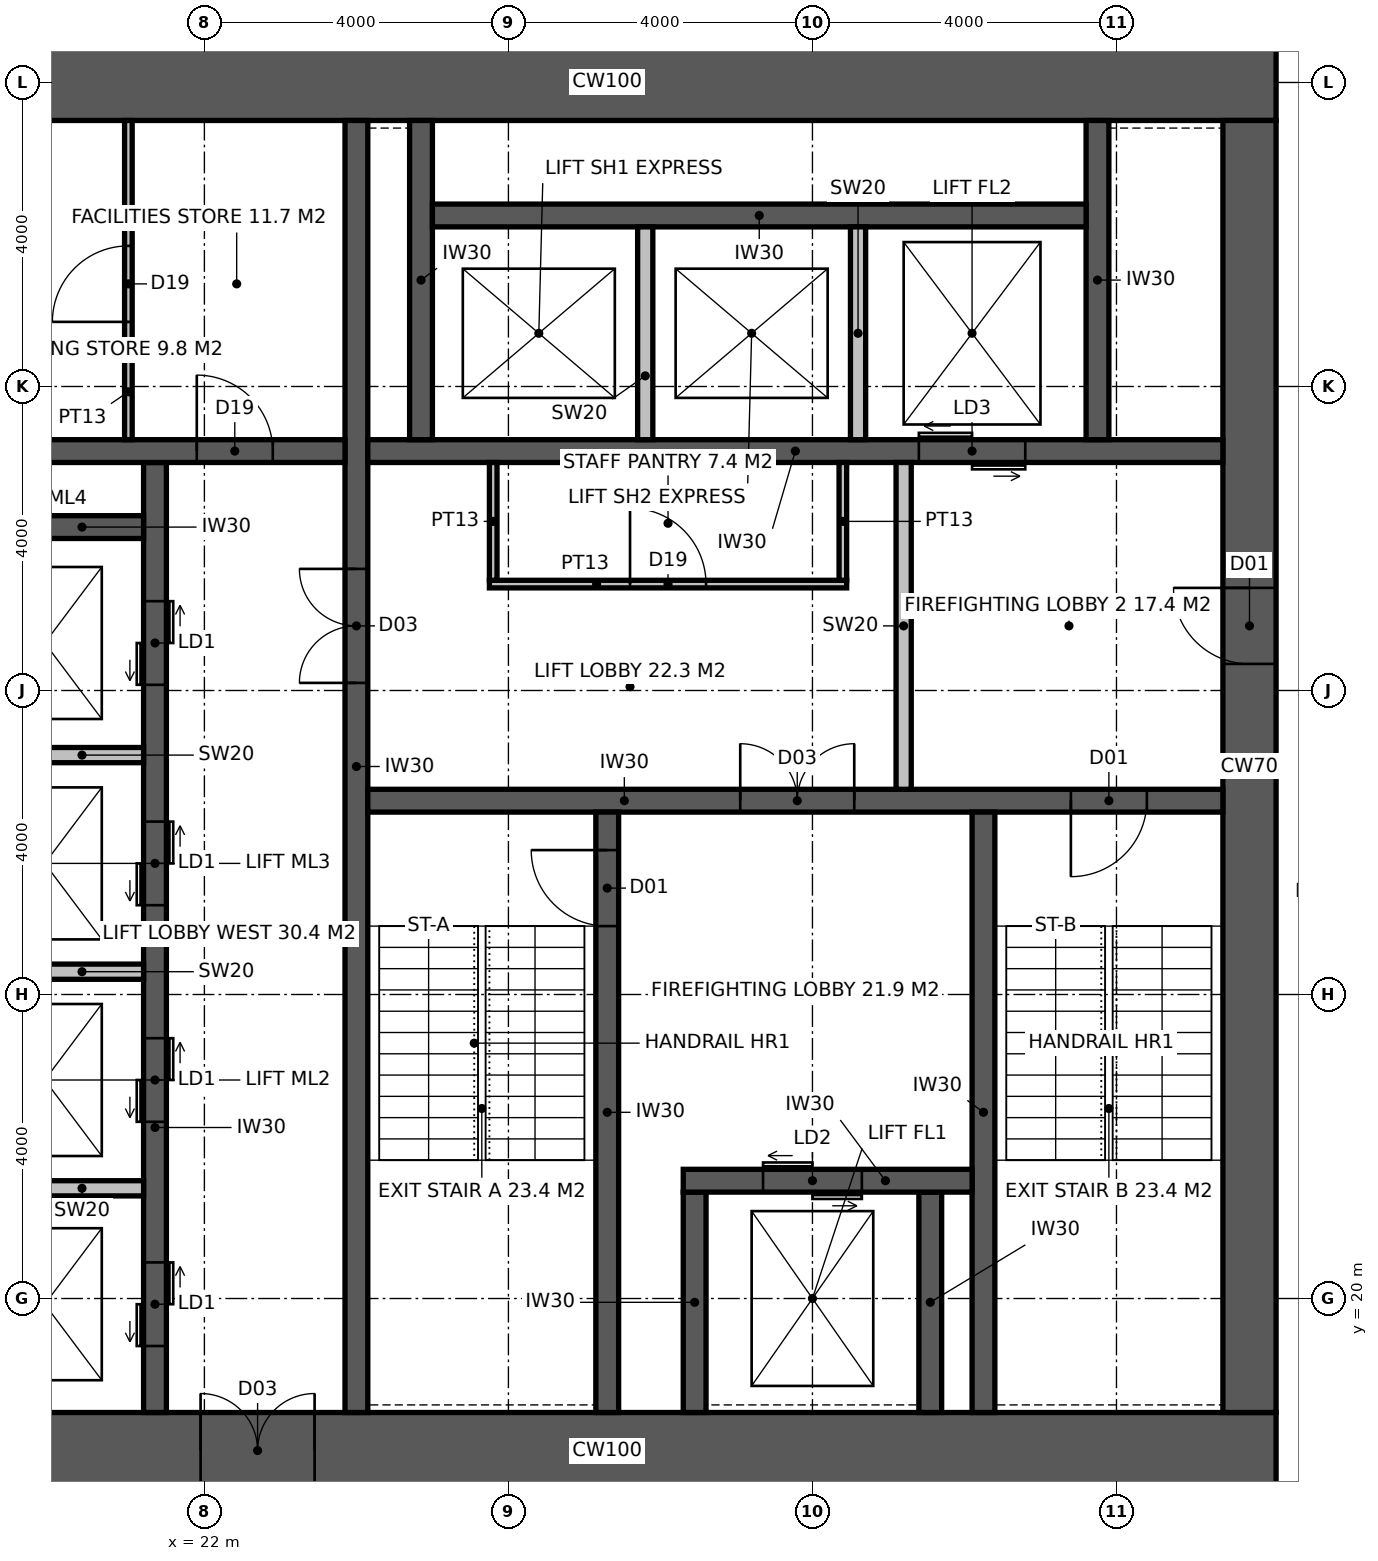
"""IFC4 building model, lengths in metres.
Left out: names, types, materials, properties, quantities, classifications, styles, units other than length and angle.
Written with IfcOpenShell. Run it as: python <this file> out.ifc"""

import sys

from ifc_helpers import new_model, si_unit, direction, frame, frame_2d, origin, place, context, subcontext, project, spatial, rectangle, extrude, element, fill, save


model = new_model("IFC4")
c1 = context("Model", 3, precision=1e-05, world=origin(), true_north=direction((0.0, 1.0)))
c2 = subcontext(c1, "Body", "Model", "MODEL_VIEW")
j1 = project(units=[si_unit("LENGTHUNIT", "METRE"), si_unit("PLANEANGLEUNIT", "RADIAN")], contexts=[c1])
p1 = place(None, origin())
s1 = spatial("IfcSite", under=j1, at=p1, CompositionType="ELEMENT")
p2 = place(p1, origin())
s2 = spatial("IfcBuilding", under=s1, at=p2, CompositionType="ELEMENT")
p3 = place(p2, frame((0.0, 0.0, 81.4)))
s3 = spatial("IfcBuildingStorey", under=s2, at=p3, CompositionType="ELEMENT", Elevation=81.4)
p4 = place(p3, frame((18.5, 18.0, -0.15), z_axis=(0.0, 0.0, 1.0), x_axis=(1.0, 0.0, 0.0)))
e1 = element("IfcWall", 1, at=p4, inside=s3, PredefinedType="SHEAR", context=c2, shape_type="SweptSolid", body=[
    extrude(rectangle(XDim=17.6, YDim=1.0, at=frame_2d((8.8, 0.0))), origin(), (0.0, 0.0, 1.0), 4.0),
])
p5 = place(p4, frame((3.45, 0.0, 0.15)))
e2 = element("IfcOpeningElement", 2, at=p5, cuts=e1, PredefinedType="OPENING", context=c2, shape_type="SweptSolid", body=[
    extrude(rectangle(XDim=1.5, YDim=2.4, at=frame_2d((0.75, 1.2))), frame((0.0, 0.51, 0.0), z_axis=(0.0, -1.0, 0.0), x_axis=(1.0, 0.0, 0.0)), (0.0, 0.0, 1.0), 1.02),
])
p6 = place(p3, frame((18.5, 36.0, -0.15), z_axis=(0.0, 0.0, 1.0), x_axis=(1.0, 0.0, 0.0)))
e3 = element("IfcWall", 3, at=p6, inside=s3, PredefinedType="SHEAR", context=c2, shape_type="SweptSolid", body=[
    extrude(rectangle(XDim=17.6, YDim=1.0, at=frame_2d((8.8, 0.0))), origin(), (0.0, 0.0, 1.0), 4.0),
])
p7 = place(p3, frame((35.75, 18.5, -0.15), z_axis=(0.0, 0.0, 1.0), x_axis=(0.0, 1.0, 0.0)))
e4 = element("IfcWall", 4, at=p7, inside=s3, PredefinedType="SHEAR", context=c2, shape_type="SweptSolid", body=[
    extrude(rectangle(XDim=17.0, YDim=0.7, at=frame_2d((8.5, 0.0))), origin(), (0.0, 0.0, 1.0), 4.0),
])
p8 = place(p7, frame((9.85, 0.0, 0.15)))
e5 = element("IfcOpeningElement", 5, at=p8, cuts=e4, PredefinedType="OPENING", context=c2, shape_type="SweptSolid", body=[
    extrude(rectangle(XDim=1.0, YDim=2.2, at=frame_2d((0.5, 1.1))), frame((0.0, 0.36, 0.0), z_axis=(0.0, -1.0, 0.0), x_axis=(1.0, 0.0, 0.0)), (0.0, 0.0, 1.0), 0.72),
])
p9 = place(p3, frame((24.0, 18.5, -0.15), z_axis=(0.0, 0.0, 1.0), x_axis=(0.0, 1.0, 0.0)))
e6 = element("IfcWall", 6, at=p9, inside=s3, PredefinedType="SHEAR", context=c2, shape_type="SweptSolid", body=[
    extrude(rectangle(XDim=17.0, YDim=0.3, at=frame_2d((8.5, 0.0))), origin(), (0.0, 0.0, 1.0), 4.0),
])
p10 = place(p9, frame((9.6, 0.0, 0.15)))
e7 = element("IfcOpeningElement", 7, at=p10, cuts=e6, PredefinedType="OPENING", context=c2, shape_type="SweptSolid", body=[
    extrude(rectangle(XDim=1.5, YDim=2.4, at=frame_2d((0.75, 1.2))), frame((0.0, 0.16, 0.0), z_axis=(0.0, -1.0, 0.0), x_axis=(1.0, 0.0, 0.0)), (0.0, 0.0, 1.0), 0.32),
])
p11 = place(p3, frame((24.15, 26.55, -0.15), z_axis=(0.0, 0.0, 1.0), x_axis=(1.0, 0.0, 0.0)))
e8 = element("IfcWall", 8, at=p11, inside=s3, PredefinedType="SHEAR", context=c2, shape_type="SweptSolid", body=[
    extrude(rectangle(XDim=11.25, YDim=0.3, at=frame_2d((5.625, 0.0))), origin(), (0.0, 0.0, 1.0), 4.0),
])
p12 = place(p11, frame((9.25, 0.0, 0.15)))
e9 = element("IfcOpeningElement", 9, at=p12, cuts=e8, PredefinedType="OPENING", context=c2, shape_type="SweptSolid", body=[
    extrude(rectangle(XDim=1.0, YDim=2.2, at=frame_2d((0.5, 1.1))), frame((0.0, 0.16, 0.0), z_axis=(0.0, -1.0, 0.0), x_axis=(1.0, 0.0, 0.0)), (0.0, 0.0, 1.0), 0.32),
])
p13 = place(p11, frame((4.9, 0.0, 0.15)))
e10 = element("IfcOpeningElement", 10, at=p13, cuts=e8, PredefinedType="OPENING", context=c2, shape_type="SweptSolid", body=[
    extrude(rectangle(XDim=1.5, YDim=2.4, at=frame_2d((0.75, 1.2))), frame((0.0, 0.16, 0.0), z_axis=(0.0, -1.0, 0.0), x_axis=(1.0, 0.0, 0.0)), (0.0, 0.0, 1.0), 0.32),
])
p14 = place(p3, frame((27.3, 18.5, -0.15), z_axis=(0.0, 0.0, 1.0), x_axis=(0.0, 1.0, 0.0)))
e11 = element("IfcWall", 11, at=p14, inside=s3, PredefinedType="SHEAR", context=c2, shape_type="SweptSolid", body=[
    extrude(rectangle(XDim=7.9, YDim=0.3, at=frame_2d((3.95, 0.0))), origin(), (0.0, 0.0, 1.0), 4.0),
])
p15 = place(p14, frame((6.4, 0.0, 0.15)))
e12 = element("IfcOpeningElement", 12, at=p15, cuts=e11, PredefinedType="OPENING", context=c2, shape_type="SweptSolid", body=[
    extrude(rectangle(XDim=1.0, YDim=2.2, at=frame_2d((0.5, 1.1))), frame((0.0, 0.16, 0.0), z_axis=(0.0, -1.0, 0.0), x_axis=(1.0, 0.0, 0.0)), (0.0, 0.0, 1.0), 0.32),
])
p16 = place(p3, frame((32.25, 18.5, -0.15), z_axis=(0.0, 0.0, 1.0), x_axis=(0.0, 1.0, 0.0)))
e13 = element("IfcWall", 13, at=p16, inside=s3, PredefinedType="SHEAR", context=c2, shape_type="SweptSolid", body=[
    extrude(rectangle(XDim=7.9, YDim=0.3, at=frame_2d((3.95, 0.0))), origin(), (0.0, 0.0, 1.0), 4.0),
])
for number, where, z_axis, x_axis in (
    (14, (28.45, 18.5, -0.15), (0.0, 0.0, 1.0), (0.0, 1.0, 0.0)),
    (15, (31.55, 18.5, -0.15), (0.0, 0.0, 1.0), (0.0, 1.0, 0.0)),
):
    element("IfcWall", number, at=place(p3, frame(where, z_axis=z_axis, x_axis=x_axis)), inside=s3, PredefinedType="SHEAR", context=c2, shape_type="SweptSolid", body=[
        extrude(rectangle(XDim=2.9, YDim=0.3, at=frame_2d((1.45, 0.0))), origin(), (0.0, 0.0, 1.0), 4.0),
    ])
p17 = place(p3, frame((28.3, 21.55, -0.15), z_axis=(0.0, 0.0, 1.0), x_axis=(1.0, 0.0, 0.0)))
e16 = element("IfcWall", 16, at=p17, inside=s3, PredefinedType="SHEAR", context=c2, shape_type="SweptSolid", body=[
    extrude(rectangle(XDim=3.8, YDim=0.3, at=frame_2d((1.9, 0.0))), origin(), (0.0, 0.0, 1.0), 4.0),
])
p18 = place(p17, frame((1.05, 0.0, 0.15)))
e17 = element("IfcOpeningElement", 17, at=p18, cuts=e16, PredefinedType="OPENING", context=c2, shape_type="SweptSolid", body=[
    extrude(rectangle(XDim=1.3, YDim=2.4, at=frame_2d((0.65, 1.2))), frame((0.0, 0.16, 0.0), z_axis=(0.0, -1.0, 0.0), x_axis=(1.0, 0.0, 0.0)), (0.0, 0.0, 1.0), 0.32),
])
p19 = place(p3, frame((24.15, 31.15, -0.15), z_axis=(0.0, 0.0, 1.0), x_axis=(1.0, 0.0, 0.0)))
e18 = element("IfcWall", 18, at=p19, inside=s3, PredefinedType="SHEAR", context=c2, shape_type="SweptSolid", body=[
    extrude(rectangle(XDim=11.25, YDim=0.3, at=frame_2d((5.625, 0.0))), origin(), (0.0, 0.0, 1.0), 4.0),
])
p20 = place(p19, frame((7.25, 0.0, 0.15)))
e19 = element("IfcOpeningElement", 19, at=p20, cuts=e18, PredefinedType="OPENING", context=c2, shape_type="SweptSolid", body=[
    extrude(rectangle(XDim=1.4, YDim=2.4, at=frame_2d((0.7, 1.2))), frame((0.0, 0.16, 0.0), z_axis=(0.0, -1.0, 0.0), x_axis=(1.0, 0.0, 0.0)), (0.0, 0.0, 1.0), 0.32),
])
p21 = place(p3, frame((21.35, 18.5, -0.15), z_axis=(0.0, 0.0, 1.0), x_axis=(0.0, 1.0, 0.0)))
e20 = element("IfcWall", 20, at=p21, inside=s3, PredefinedType="SHEAR", context=c2, shape_type="SweptSolid", body=[
    extrude(rectangle(XDim=12.5, YDim=0.3, at=frame_2d((6.25, 0.0))), origin(), (0.0, 0.0, 1.0), 4.0),
])
p22 = place(p21, frame((0.875, 0.0, 0.15)))
e21 = element("IfcOpeningElement", 21, at=p22, cuts=e20, PredefinedType="OPENING", context=c2, shape_type="SweptSolid", body=[
    extrude(rectangle(XDim=1.1, YDim=2.2, at=frame_2d((0.55, 1.1))), frame((0.0, 0.16, 0.0), z_axis=(0.0, -1.0, 0.0), x_axis=(1.0, 0.0, 0.0)), (0.0, 0.0, 1.0), 0.32),
])
p23 = place(p21, frame((3.825, 0.0, 0.15)))
e22 = element("IfcOpeningElement", 22, at=p23, cuts=e20, PredefinedType="OPENING", context=c2, shape_type="SweptSolid", body=[
    extrude(rectangle(XDim=1.1, YDim=2.2, at=frame_2d((0.55, 1.1))), frame((0.0, 0.16, 0.0), z_axis=(0.0, -1.0, 0.0), x_axis=(1.0, 0.0, 0.0)), (0.0, 0.0, 1.0), 0.32),
])
p24 = place(p21, frame((6.675, 0.0, 0.15)))
e23 = element("IfcOpeningElement", 23, at=p24, cuts=e20, PredefinedType="OPENING", context=c2, shape_type="SweptSolid", body=[
    extrude(rectangle(XDim=1.1, YDim=2.2, at=frame_2d((0.55, 1.1))), frame((0.0, 0.16, 0.0), z_axis=(0.0, -1.0, 0.0), x_axis=(1.0, 0.0, 0.0)), (0.0, 0.0, 1.0), 0.32),
])
p25 = place(p21, frame((9.575, 0.0, 0.15)))
e24 = element("IfcOpeningElement", 24, at=p25, cuts=e20, PredefinedType="OPENING", context=c2, shape_type="SweptSolid", body=[
    extrude(rectangle(XDim=1.1, YDim=2.2, at=frame_2d((0.55, 1.1))), frame((0.0, 0.16, 0.0), z_axis=(0.0, -1.0, 0.0), x_axis=(1.0, 0.0, 0.0)), (0.0, 0.0, 1.0), 0.32),
])
p26 = place(p3, frame((18.5, 31.15, -0.15), z_axis=(0.0, 0.0, 1.0), x_axis=(1.0, 0.0, 0.0)))
e25 = element("IfcWall", 25, at=p26, inside=s3, PredefinedType="SHEAR", context=c2, shape_type="SweptSolid", body=[
    extrude(rectangle(XDim=5.35, YDim=0.3, at=frame_2d((2.675, 0.0))), origin(), (0.0, 0.0, 1.0), 4.0),
])
p27 = place(p26, frame((3.4, 0.0, 0.15)))
e26 = element("IfcOpeningElement", 26, at=p27, cuts=e25, PredefinedType="OPENING", context=c2, shape_type="SweptSolid", body=[
    extrude(rectangle(XDim=1.0, YDim=2.2, at=frame_2d((0.5, 1.1))), frame((0.0, 0.16, 0.0), z_axis=(0.0, -1.0, 0.0), x_axis=(1.0, 0.0, 0.0)), (0.0, 0.0, 1.0), 0.32),
])
p28 = place(p3, frame((18.5, 30.15, -0.15), z_axis=(0.0, 0.0, 1.0), x_axis=(1.0, 0.0, 0.0)))
e27 = element("IfcWall", 27, at=p28, inside=s3, PredefinedType="SHEAR", context=c2, shape_type="SweptSolid", body=[
    extrude(rectangle(XDim=2.7, YDim=0.3, at=frame_2d((1.35, 0.0))), origin(), (0.0, 0.0, 1.0), 4.0),
])
for number, where, z_axis, x_axis in (
    (28, (24.85, 31.3, -0.15), (0.0, 0.0, 1.0), (0.0, 1.0, 0.0)),
    (29, (33.75, 31.3, -0.15), (0.0, 0.0, 1.0), (0.0, 1.0, 0.0)),
):
    element("IfcWall", number, at=place(p3, frame(where, z_axis=z_axis, x_axis=x_axis)), inside=s3, PredefinedType="SHEAR", context=c2, shape_type="SweptSolid", body=[
        extrude(rectangle(XDim=4.2, YDim=0.3, at=frame_2d((2.1, 0.0))), origin(), (0.0, 0.0, 1.0), 4.0),
    ])
p29 = place(p3, frame((25.0, 34.25, -0.15), z_axis=(0.0, 0.0, 1.0), x_axis=(1.0, 0.0, 0.0)))
e30 = element("IfcWall", 30, at=p29, inside=s3, PredefinedType="SHEAR", context=c2, shape_type="SweptSolid", body=[
    extrude(rectangle(XDim=8.6, YDim=0.3, at=frame_2d((4.3, 0.0))), origin(), (0.0, 0.0, 1.0), 4.0),
])
for number, where, z_axis, x_axis in (
    (31, (27.8, 31.3, -0.15), (0.0, 0.0, 1.0), (0.0, 1.0, 0.0)),
    (32, (30.6, 31.3, -0.15), (0.0, 0.0, 1.0), (0.0, 1.0, 0.0)),
):
    element("IfcWall", number, at=place(p3, frame(where, z_axis=z_axis, x_axis=x_axis)), inside=s3, PredefinedType="SOLIDWALL", context=c2, shape_type="SweptSolid", body=[
        extrude(rectangle(XDim=2.8, YDim=0.2, at=frame_2d((1.4, 0.0))), origin(), (0.0, 0.0, 1.0), 4.0),
    ])
for number, where, z_axis, x_axis in (
    (33, (18.5, 21.45, -0.15), (0.0, 0.0, 1.0), (1.0, 0.0, 0.0)),
    (34, (18.5, 24.3, -0.15), (0.0, 0.0, 1.0), (1.0, 0.0, 0.0)),
    (35, (18.5, 27.15, -0.15), (0.0, 0.0, 1.0), (1.0, 0.0, 0.0)),
):
    element("IfcWall", number, at=place(p3, frame(where, z_axis=z_axis, x_axis=x_axis)), inside=s3, PredefinedType="SOLIDWALL", context=c2, shape_type="SweptSolid", body=[
        extrude(rectangle(XDim=2.7, YDim=0.2, at=frame_2d((1.35, 0.0))), origin(), (0.0, 0.0, 1.0), 4.0),
    ])
p30 = place(p3, frame((31.2, 26.7, 0.0), z_axis=(0.0, 0.0, 1.0), x_axis=(0.0, 1.0, 0.0)))
e36 = element("IfcWall", 36, at=p30, inside=s3, PredefinedType="SOLIDWALL", context=c2, shape_type="SweptSolid", body=[
    extrude(rectangle(XDim=4.3, YDim=0.2, at=frame_2d((2.15, 0.0))), origin(), (0.0, 0.0, 1.0), 3.85),
])
p31 = place(p3, frame((21.0, 31.3, 0.0), z_axis=(0.0, 0.0, 1.0), x_axis=(0.0, 1.0, 0.0)))
e37 = element("IfcWall", 37, at=p31, inside=s3, PredefinedType="PARTITIONING", context=c2, shape_type="SweptSolid", body=[
    extrude(rectangle(XDim=4.2, YDim=0.1, at=frame_2d((2.1, 0.0))), origin(), (0.0, 0.0, 1.0), 3.85),
])
p32 = place(p31, frame((1.55, 0.0, 0.0)))
e38 = element("IfcOpeningElement", 38, at=p32, cuts=e37, PredefinedType="OPENING", context=c2, shape_type="SweptSolid", body=[
    extrude(rectangle(XDim=1.0, YDim=2.2, at=frame_2d((0.5, 1.1))), frame((0.0, 0.06, 0.0), z_axis=(0.0, -1.0, 0.0), x_axis=(1.0, 0.0, 0.0)), (0.0, 0.0, 1.0), 0.12),
])
p33 = place(p3, frame((25.75, 29.4, 0.0), z_axis=(0.0, 0.0, 1.0), x_axis=(1.0, 0.0, 0.0)))
e39 = element("IfcWall", 39, at=p33, inside=s3, PredefinedType="PARTITIONING", context=c2, shape_type="SweptSolid", body=[
    extrude(rectangle(XDim=4.7, YDim=0.1, at=frame_2d((2.35, 0.0))), origin(), (0.0, 0.0, 1.0), 3.85),
])
p34 = place(p33, frame((1.85, 0.0, 0.0)))
e40 = element("IfcOpeningElement", 40, at=p34, cuts=e39, PredefinedType="OPENING", context=c2, shape_type="SweptSolid", body=[
    extrude(rectangle(XDim=1.0, YDim=2.2, at=frame_2d((0.5, 1.1))), frame((0.0, 0.06, 0.0), z_axis=(0.0, -1.0, 0.0), x_axis=(1.0, 0.0, 0.0)), (0.0, 0.0, 1.0), 0.12),
])
for number, where, z_axis, x_axis in (
    (41, (25.8, 29.45, 0.0), (0.0, 0.0, 1.0), (0.0, 1.0, 0.0)),
    (42, (30.4, 29.45, 0.0), (0.0, 0.0, 1.0), (0.0, 1.0, 0.0)),
):
    element("IfcWall", number, at=place(p3, frame(where, z_axis=z_axis, x_axis=x_axis)), inside=s3, PredefinedType="PARTITIONING", context=c2, shape_type="SweptSolid", body=[
        extrude(rectangle(XDim=1.55, YDim=0.1, at=frame_2d((0.775, 0.0))), origin(), (0.0, 0.0, 1.0), 3.85),
    ])
p35 = place(p15, origin())
e43 = element("IfcDoor", 43, at=p35, inside=s3, OperationType="SINGLE_SWING_RIGHT", PredefinedType="DOOR", context=c2, shape_type="SweptSolid", body=[
    extrude(rectangle(XDim=1.0, YDim=2.2, at=frame_2d((0.5, 1.1))), frame((0.0, 0.025, 0.0), z_axis=(0.0, -1.0, 0.0), x_axis=(1.0, 0.0, 0.0)), (0.0, 0.0, 1.0), 0.05),
])
fill(e12, e43)
p36 = place(p12, frame((1.0, 0.0, 0.0), z_axis=(0.0, 0.0, 1.0), x_axis=(-1.0, 0.0, 0.0)))
e44 = element("IfcDoor", 44, at=p36, inside=s3, OperationType="SINGLE_SWING_RIGHT", PredefinedType="DOOR", context=c2, shape_type="SweptSolid", body=[
    extrude(rectangle(XDim=1.0, YDim=2.2, at=frame_2d((0.5, 1.1))), frame((0.0, 0.025, 0.0), z_axis=(0.0, -1.0, 0.0), x_axis=(1.0, 0.0, 0.0)), (0.0, 0.0, 1.0), 0.05),
])
fill(e9, e44)
p37 = place(p8, origin())
e45 = element("IfcDoor", 45, at=p37, inside=s3, OperationType="SINGLE_SWING_RIGHT", PredefinedType="DOOR", context=c2, shape_type="SweptSolid", body=[
    extrude(rectangle(XDim=1.0, YDim=2.2, at=frame_2d((0.5, 1.1))), frame((0.0, 0.025, 0.0), z_axis=(0.0, -1.0, 0.0), x_axis=(1.0, 0.0, 0.0)), (0.0, 0.0, 1.0), 0.05),
])
fill(e5, e45)
p38 = place(p13, origin())
e46 = element("IfcDoor", 46, at=p38, inside=s3, OperationType="DOUBLE_DOOR_DOUBLE_SWING", PredefinedType="DOOR", context=c2, shape_type="SweptSolid", body=[
    extrude(rectangle(XDim=1.5, YDim=2.4, at=frame_2d((0.75, 1.2))), frame((0.0, 0.025, 0.0), z_axis=(0.0, -1.0, 0.0), x_axis=(1.0, 0.0, 0.0)), (0.0, 0.0, 1.0), 0.05),
])
fill(e10, e46)
p39 = place(p10, origin())
e47 = element("IfcDoor", 47, at=p39, inside=s3, OperationType="DOUBLE_DOOR_DOUBLE_SWING", PredefinedType="DOOR", context=c2, shape_type="SweptSolid", body=[
    extrude(rectangle(XDim=1.5, YDim=2.4, at=frame_2d((0.75, 1.2))), frame((0.0, 0.025, 0.0), z_axis=(0.0, -1.0, 0.0), x_axis=(1.0, 0.0, 0.0)), (0.0, 0.0, 1.0), 0.05),
])
fill(e7, e47)
p40 = place(p27, origin())
e48 = element("IfcDoor", 48, at=p40, inside=s3, OperationType="SINGLE_SWING_LEFT", PredefinedType="DOOR", context=c2, shape_type="SweptSolid", body=[
    extrude(rectangle(XDim=1.0, YDim=2.2, at=frame_2d((0.5, 1.1))), frame((0.0, 0.025, 0.0), z_axis=(0.0, -1.0, 0.0), x_axis=(1.0, 0.0, 0.0)), (0.0, 0.0, 1.0), 0.05),
])
fill(e26, e48)
p41 = place(p32, origin())
e49 = element("IfcDoor", 49, at=p41, inside=s3, OperationType="SINGLE_SWING_LEFT", PredefinedType="DOOR", context=c2, shape_type="SweptSolid", body=[
    extrude(rectangle(XDim=1.0, YDim=2.2, at=frame_2d((0.5, 1.1))), frame((0.0, 0.025, 0.0), z_axis=(0.0, -1.0, 0.0), x_axis=(1.0, 0.0, 0.0)), (0.0, 0.0, 1.0), 0.05),
])
fill(e38, e49)
p42 = place(p34, origin())
e50 = element("IfcDoor", 50, at=p42, inside=s3, OperationType="SINGLE_SWING_LEFT", PredefinedType="DOOR", context=c2, shape_type="SweptSolid", body=[
    extrude(rectangle(XDim=1.0, YDim=2.2, at=frame_2d((0.5, 1.1))), frame((0.0, 0.025, 0.0), z_axis=(0.0, -1.0, 0.0), x_axis=(1.0, 0.0, 0.0)), (0.0, 0.0, 1.0), 0.05),
])
fill(e40, e50)
p43 = place(p5, origin())
e51 = element("IfcDoor", 51, at=p43, inside=s3, OperationType="DOUBLE_DOOR_DOUBLE_SWING", PredefinedType="DOOR", context=c2, shape_type="SweptSolid", body=[
    extrude(rectangle(XDim=1.5, YDim=2.4, at=frame_2d((0.75, 1.2))), frame((0.0, 0.025, 0.0), z_axis=(0.0, -1.0, 0.0), x_axis=(1.0, 0.0, 0.0)), (0.0, 0.0, 1.0), 0.05),
])
fill(e2, e51)
p44 = place(p18, origin())
e52 = element("IfcDoor", 52, at=p44, inside=s3, OperationType="DOUBLE_DOOR_SLIDING", PredefinedType="DOOR", context=c2, shape_type="SweptSolid", body=[
    extrude(rectangle(XDim=1.3, YDim=2.4, at=frame_2d((0.65, 1.2))), frame((0.0, 0.025, 0.0), z_axis=(0.0, -1.0, 0.0), x_axis=(1.0, 0.0, 0.0)), (0.0, 0.0, 1.0), 0.05),
])
fill(e17, e52)
p45 = place(p20, origin())
e53 = element("IfcDoor", 53, at=p45, inside=s3, OperationType="DOUBLE_DOOR_SLIDING", PredefinedType="DOOR", context=c2, shape_type="SweptSolid", body=[
    extrude(rectangle(XDim=1.4, YDim=2.4, at=frame_2d((0.7, 1.2))), frame((0.0, 0.025, 0.0), z_axis=(0.0, -1.0, 0.0), x_axis=(1.0, 0.0, 0.0)), (0.0, 0.0, 1.0), 0.05),
])
fill(e19, e53)
p46 = place(p22, origin())
e54 = element("IfcDoor", 54, at=p46, inside=s3, OperationType="DOUBLE_DOOR_SLIDING", PredefinedType="DOOR", context=c2, shape_type="SweptSolid", body=[
    extrude(rectangle(XDim=1.1, YDim=2.2, at=frame_2d((0.55, 1.1))), frame((0.0, 0.025, 0.0), z_axis=(0.0, -1.0, 0.0), x_axis=(1.0, 0.0, 0.0)), (0.0, 0.0, 1.0), 0.05),
])
fill(e21, e54)
p47 = place(p23, origin())
e55 = element("IfcDoor", 55, at=p47, inside=s3, OperationType="DOUBLE_DOOR_SLIDING", PredefinedType="DOOR", context=c2, shape_type="SweptSolid", body=[
    extrude(rectangle(XDim=1.1, YDim=2.2, at=frame_2d((0.55, 1.1))), frame((0.0, 0.025, 0.0), z_axis=(0.0, -1.0, 0.0), x_axis=(1.0, 0.0, 0.0)), (0.0, 0.0, 1.0), 0.05),
])
fill(e22, e55)
p48 = place(p24, origin())
e56 = element("IfcDoor", 56, at=p48, inside=s3, OperationType="DOUBLE_DOOR_SLIDING", PredefinedType="DOOR", context=c2, shape_type="SweptSolid", body=[
    extrude(rectangle(XDim=1.1, YDim=2.2, at=frame_2d((0.55, 1.1))), frame((0.0, 0.025, 0.0), z_axis=(0.0, -1.0, 0.0), x_axis=(1.0, 0.0, 0.0)), (0.0, 0.0, 1.0), 0.05),
])
fill(e23, e56)
p49 = place(p25, origin())
e57 = element("IfcDoor", 57, at=p49, inside=s3, OperationType="DOUBLE_DOOR_SLIDING", PredefinedType="DOOR", context=c2, shape_type="SweptSolid", body=[
    extrude(rectangle(XDim=1.1, YDim=2.2, at=frame_2d((0.55, 1.1))), frame((0.0, 0.025, 0.0), z_axis=(0.0, -1.0, 0.0), x_axis=(1.0, 0.0, 0.0)), (0.0, 0.0, 1.0), 0.05),
])
fill(e24, e57)
save(model, sys.argv[1])
